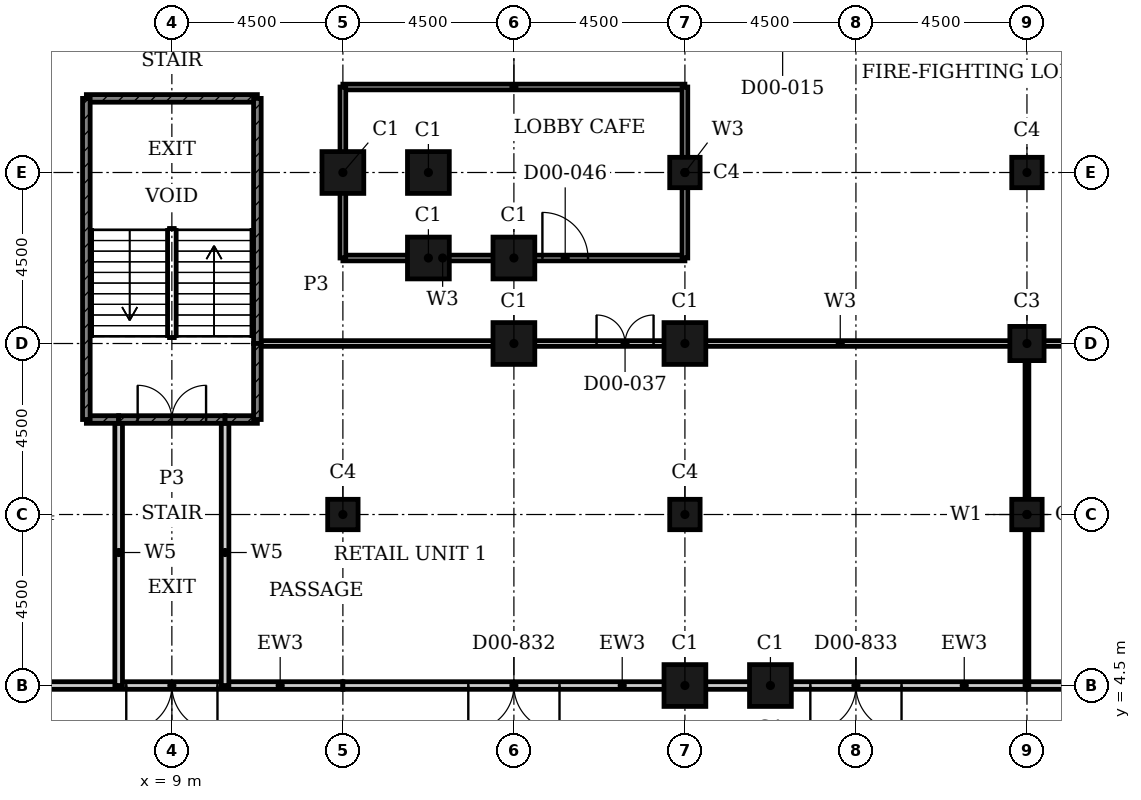
"""IFC4 building model, lengths in metres.
Left out: names, types, materials, properties, quantities, classifications, styles, units other than length and angle.
Written with IfcOpenShell. Run it as: python <this file> out.ifc"""

import sys

from ifc_helpers import new_model, si_unit, direction, frame, frame_2d, origin, origin_2d, place, context, subcontext, project, spatial, rectangle, hollow_rectangle, extrude, element, fill, save


model = new_model("IFC4")
c1 = context("Model", 3, precision=1e-05, world=origin(), true_north=direction((0.0, 1.0)))
c2 = subcontext(c1, "Body", "Model", "MODEL_VIEW")
j1 = project(units=[si_unit("LENGTHUNIT", "METRE"), si_unit("PLANEANGLEUNIT", "RADIAN")], contexts=[c1])
p1 = place(None, origin())
s1 = spatial("IfcSite", under=j1, at=p1, CompositionType="ELEMENT")
p2 = place(p1, origin())
s2 = spatial("IfcBuilding", under=s1, at=p2, CompositionType="ELEMENT")
p3 = place(p2, origin())
s3 = spatial("IfcBuildingStorey", under=s2, at=p3, CompositionType="ELEMENT", Elevation=0.0)
for number, where, z_axis, x_axis in (
    (1, (22.5, 4.5, 0.0), (0.0, 0.0, 1.0), (1.0, 0.0, 0.0)),
    (2, (24.75, 4.5, 0.0), (0.0, 0.0, 1.0), (1.0, 0.0, 0.0)),
    (3, (13.5, 18.0, 0.0), (0.0, 0.0, 1.0), (1.0, 0.0, 0.0)),
    (4, (15.75, 18.0, 0.0), (0.0, 0.0, 1.0), (1.0, 0.0, 0.0)),
    (5, (15.75, 15.75, 0.0), (0.0, 0.0, 1.0), (1.0, 0.0, 0.0)),
    (6, (18.0, 15.75, 0.0), (0.0, 0.0, 1.0), (1.0, 0.0, 0.0)),
    (7, (18.0, 13.5, 0.0), (0.0, 0.0, 1.0), (1.0, 0.0, 0.0)),
    (8, (22.5, 13.5, 0.0), (0.0, 0.0, 1.0), (1.0, 0.0, 0.0)),
):
    element("IfcColumn", number, at=place(p3, frame(where, z_axis=z_axis, x_axis=x_axis)), inside=s3, PredefinedType="COLUMN", context=c2, shape_type="SweptSolid", body=[
        extrude(hollow_rectangle(XDim=1.1, YDim=1.1, WallThickness=0.036, at=origin_2d()), origin(), (0.0, 0.0, 1.0), 6.6),
    ])
p4 = place(p3, frame((31.5, 13.5, 0.0), z_axis=(0.0, 0.0, 1.0), x_axis=(1.0, 0.0, 0.0)))
e9 = element("IfcColumn", 9, at=p4, inside=s3, PredefinedType="COLUMN", context=c2, shape_type="SweptSolid", body=[
    extrude(hollow_rectangle(XDim=0.9, YDim=0.9, WallThickness=0.028, at=origin_2d()), origin(), (0.0, 0.0, 1.0), 6.6),
])
for number, where, z_axis, x_axis in (
    (10, (13.5, 9.0, 0.0), (0.0, 0.0, 1.0), (1.0, 0.0, 0.0)),
    (11, (22.5, 9.0, 0.0), (0.0, 0.0, 1.0), (1.0, 0.0, 0.0)),
    (12, (22.5, 18.0, 0.0), (0.0, 0.0, 1.0), (1.0, 0.0, 0.0)),
    (13, (31.5, 9.0, 0.0), (0.0, 0.0, 1.0), (1.0, 0.0, 0.0)),
    (14, (31.5, 18.0, 0.0), (0.0, 0.0, 1.0), (1.0, 0.0, 0.0)),
):
    element("IfcColumn", number, at=place(p3, frame(where, z_axis=z_axis, x_axis=x_axis)), inside=s3, PredefinedType="COLUMN", context=c2, shape_type="SweptSolid", body=[
        extrude(hollow_rectangle(XDim=0.8, YDim=0.8, WallThickness=0.025, at=origin_2d()), origin(), (0.0, 0.0, 1.0), 6.6),
    ])
p5 = place(p3, frame((13.5, 4.5, 0.0), z_axis=(0.0, 0.0, 1.0), x_axis=(-1.0, 0.0, 0.0)))
e15 = element("IfcWall", 15, at=p5, inside=s3, PredefinedType="SOLIDWALL", context=c2, shape_type="SweptSolid", body=[
    extrude(rectangle(XDim=9.0, YDim=0.2, at=frame_2d((4.5, 0.0))), origin(), (0.0, 0.0, 1.0), 6.25),
])
p6 = place(p5, frame((3.3, 0.0, 0.0)))
e16 = element("IfcOpeningElement", 16, at=p6, cuts=e15, PredefinedType="OPENING", context=c2, shape_type="SweptSolid", body=[
    extrude(rectangle(XDim=2.4, YDim=2.4, at=frame_2d((1.2, 1.2))), frame((0.0, 0.11, 0.0), z_axis=(0.0, -1.0, 0.0), x_axis=(1.0, 0.0, 0.0)), (0.0, 0.0, 1.0), 0.22),
])
p7 = place(p3, frame((22.5, 4.5, 0.0), z_axis=(0.0, 0.0, 1.0), x_axis=(-1.0, 0.0, 0.0)))
e17 = element("IfcWall", 17, at=p7, inside=s3, PredefinedType="SOLIDWALL", context=c2, shape_type="SweptSolid", body=[
    extrude(rectangle(XDim=9.0, YDim=0.2, at=frame_2d((4.5, 0.0))), origin(), (0.0, 0.0, 1.0), 6.25),
])
p8 = place(p7, frame((3.3, 0.0, 0.0)))
e18 = element("IfcOpeningElement", 18, at=p8, cuts=e17, PredefinedType="OPENING", context=c2, shape_type="SweptSolid", body=[
    extrude(rectangle(XDim=2.4, YDim=2.4, at=frame_2d((1.2, 1.2))), frame((0.0, 0.11, 0.0), z_axis=(0.0, -1.0, 0.0), x_axis=(1.0, 0.0, 0.0)), (0.0, 0.0, 1.0), 0.22),
])
p9 = place(p3, frame((31.5, 4.5, 0.0), z_axis=(0.0, 0.0, 1.0), x_axis=(-1.0, 0.0, 0.0)))
e19 = element("IfcWall", 19, at=p9, inside=s3, PredefinedType="SOLIDWALL", context=c2, shape_type="SweptSolid", body=[
    extrude(rectangle(XDim=9.0, YDim=0.2, at=frame_2d((4.5, 0.0))), origin(), (0.0, 0.0, 1.0), 6.25),
])
p10 = place(p9, frame((3.3, 0.0, 0.0)))
e20 = element("IfcOpeningElement", 20, at=p10, cuts=e19, PredefinedType="OPENING", context=c2, shape_type="SweptSolid", body=[
    extrude(rectangle(XDim=2.4, YDim=2.4, at=frame_2d((1.2, 1.2))), frame((0.0, 0.11, 0.0), z_axis=(0.0, -1.0, 0.0), x_axis=(1.0, 0.0, 0.0)), (0.0, 0.0, 1.0), 0.22),
])
p11 = place(p3, frame((40.5, 4.5, 0.0), z_axis=(0.0, 0.0, 1.0), x_axis=(-1.0, 0.0, 0.0)))
e21 = element("IfcWall", 21, at=p11, inside=s3, PredefinedType="SOLIDWALL", context=c2, shape_type="SweptSolid", body=[
    extrude(rectangle(XDim=9.0, YDim=0.2, at=frame_2d((4.5, 0.0))), origin(), (0.0, 0.0, 1.0), 6.25),
])
p12 = place(p11, frame((3.3, 0.0, 0.0)))
e22 = element("IfcOpeningElement", 22, at=p12, cuts=e21, PredefinedType="OPENING", context=c2, shape_type="SweptSolid", body=[
    extrude(rectangle(XDim=2.4, YDim=2.4, at=frame_2d((1.2, 1.2))), frame((0.0, 0.11, 0.0), z_axis=(0.0, -1.0, 0.0), x_axis=(1.0, 0.0, 0.0)), (0.0, 0.0, 1.0), 0.22),
])
p13 = place(p3, frame((11.25, 13.5, 0.0), z_axis=(0.0, 0.0, 1.0), x_axis=(1.0, 0.0, 0.0)))
e23 = element("IfcWall", 23, at=p13, inside=s3, PredefinedType="PARTITIONING", context=c2, shape_type="SweptSolid", body=[
    extrude(rectangle(XDim=20.25, YDim=0.15, at=frame_2d((10.125, 0.0))), origin(), (0.0, 0.0, 1.0), 6.25),
])
p14 = place(p13, frame((8.925, 0.0, 0.0)))
e24 = element("IfcOpeningElement", 24, at=p14, cuts=e23, PredefinedType="OPENING", context=c2, shape_type="SweptSolid", body=[
    extrude(rectangle(XDim=1.5, YDim=2.4, at=frame_2d((0.75, 1.2))), frame((0.0, 0.085, 0.0), z_axis=(0.0, -1.0, 0.0), x_axis=(1.0, 0.0, 0.0)), (0.0, 0.0, 1.0), 0.17),
])
p15 = place(p3, frame((31.5, 13.5, 0.0), z_axis=(0.0, 0.0, 1.0), x_axis=(1.0, 0.0, 0.0)))
e25 = element("IfcWall", 25, at=p15, inside=s3, PredefinedType="PARTITIONING", context=c2, shape_type="SweptSolid", body=[
    extrude(rectangle(XDim=9.0, YDim=0.15, at=frame_2d((4.5, 0.0))), origin(), (0.0, 0.0, 1.0), 6.25),
])
p16 = place(p15, frame((3.75, 0.0, 0.0)))
e26 = element("IfcOpeningElement", 26, at=p16, cuts=e25, PredefinedType="OPENING", context=c2, shape_type="SweptSolid", body=[
    extrude(rectangle(XDim=1.5, YDim=2.4, at=frame_2d((0.75, 1.2))), frame((0.0, 0.085, 0.0), z_axis=(0.0, -1.0, 0.0), x_axis=(1.0, 0.0, 0.0)), (0.0, 0.0, 1.0), 0.17),
])
p17 = place(p3, frame((13.5, 15.75, 0.0), z_axis=(0.0, 0.0, 1.0), x_axis=(1.0, 0.0, 0.0)))
e27 = element("IfcWall", 27, at=p17, inside=s3, PredefinedType="PARTITIONING", context=c2, shape_type="SweptSolid", body=[
    extrude(rectangle(XDim=9.0, YDim=0.15, at=frame_2d((4.5, 0.0))), origin(), (0.0, 0.0, 1.0), 6.25),
])
p18 = place(p17, frame((5.25, 0.0, 0.0)))
e28 = element("IfcOpeningElement", 28, at=p18, cuts=e27, PredefinedType="OPENING", context=c2, shape_type="SweptSolid", body=[
    extrude(rectangle(XDim=1.2, YDim=2.4, at=frame_2d((0.6, 1.2))), frame((0.0, 0.085, 0.0), z_axis=(0.0, -1.0, 0.0), x_axis=(1.0, 0.0, 0.0)), (0.0, 0.0, 1.0), 0.17),
])
p19 = place(p3, frame((13.5, 20.25, 0.0), z_axis=(0.0, 0.0, 1.0), x_axis=(1.0, 0.0, 0.0)))
e29 = element("IfcWall", 29, at=p19, inside=s3, PredefinedType="PARTITIONING", context=c2, shape_type="SweptSolid", body=[
    extrude(rectangle(XDim=9.0, YDim=0.15, at=frame_2d((4.5, 0.0))), origin(), (0.0, 0.0, 1.0), 6.25),
])
for number, where, z_axis, x_axis in (
    (30, (13.5, 15.75, 0.0), (0.0, 0.0, 1.0), (0.0, 1.0, 0.0)),
    (31, (22.5, 15.75, 0.0), (0.0, 0.0, 1.0), (0.0, 1.0, 0.0)),
):
    element("IfcWall", number, at=place(p3, frame(where, z_axis=z_axis, x_axis=x_axis)), inside=s3, PredefinedType="PARTITIONING", context=c2, shape_type="SweptSolid", body=[
        extrude(rectangle(XDim=4.5, YDim=0.15, at=frame_2d((2.25, 0.0))), origin(), (0.0, 0.0, 1.0), 6.25),
    ])
p20 = place(p3, frame((31.5, 4.5, 0.0), z_axis=(0.0, 0.0, 1.0), x_axis=(0.0, 1.0, 0.0)))
e32 = element("IfcWall", 32, at=p20, inside=s3, PredefinedType="PARTITIONING", context=c2, shape_type="SweptSolid", body=[
    extrude(rectangle(XDim=9.0, YDim=0.1, at=frame_2d((4.5, 0.0))), origin(), (0.0, 0.0, 1.0), 6.25),
])
for number, where, z_axis, x_axis in (
    (33, (10.4, 4.5, 0.0), (0.0, 0.0, 1.0), (0.0, 1.0, 0.0)),
    (34, (7.6, 4.5, 0.0), (0.0, 0.0, 1.0), (0.0, 1.0, 0.0)),
):
    element("IfcWall", number, at=place(p3, frame(where, z_axis=z_axis, x_axis=x_axis)), inside=s3, PredefinedType="PARTITIONING", context=c2, shape_type="SweptSolid", body=[
        extrude(rectangle(XDim=7.0, YDim=0.2, at=frame_2d((3.5, 0.0))), origin(), (0.0, 0.0, 1.0), 6.25),
    ])
p21 = place(p3, frame((6.75, 11.5, 0.0), z_axis=(0.0, 0.0, 1.0), x_axis=(1.0, 0.0, 0.0)))
e35 = element("IfcWall", 35, at=p21, inside=s3, PredefinedType="SHEAR", context=c2, shape_type="SweptSolid", body=[
    extrude(rectangle(XDim=0.85, YDim=0.2, at=frame_2d((0.425, 0.0))), origin(), (0.0, 0.0, 1.0), 6.25),
])
p22 = place(p3, frame((7.6, 11.5, 0.0), z_axis=(0.0, 0.0, 1.0), x_axis=(1.0, 0.0, 0.0)))
e36 = element("IfcWall", 36, at=p22, inside=s3, PredefinedType="SHEAR", context=c2, shape_type="SweptSolid", body=[
    extrude(rectangle(XDim=2.8, YDim=0.2, at=frame_2d((1.4, 0.0))), origin(), (0.0, 0.0, 1.0), 6.25),
])
p23 = place(p22, frame((0.5, 0.0, 0.0)))
e37 = element("IfcOpeningElement", 37, at=p23, cuts=e36, PredefinedType="OPENING", context=c2, shape_type="SweptSolid", body=[
    extrude(rectangle(XDim=1.8, YDim=2.1, at=frame_2d((0.9, 1.05))), frame((0.0, 0.11, 0.0), z_axis=(0.0, -1.0, 0.0), x_axis=(1.0, 0.0, 0.0)), (0.0, 0.0, 1.0), 0.22),
])
p24 = place(p3, frame((10.4, 11.5, 0.0), z_axis=(0.0, 0.0, 1.0), x_axis=(1.0, 0.0, 0.0)))
e38 = element("IfcWall", 38, at=p24, inside=s3, PredefinedType="SHEAR", context=c2, shape_type="SweptSolid", body=[
    extrude(rectangle(XDim=0.85, YDim=0.2, at=frame_2d((0.425, 0.0))), origin(), (0.0, 0.0, 1.0), 6.25),
])
p25 = place(p3, frame((6.75, 19.95, 0.0), z_axis=(0.0, 0.0, 1.0), x_axis=(1.0, 0.0, 0.0)))
e39 = element("IfcWall", 39, at=p25, inside=s3, PredefinedType="SHEAR", context=c2, shape_type="SweptSolid", body=[
    extrude(rectangle(XDim=4.5, YDim=0.2, at=frame_2d((2.25, 0.0))), origin(), (0.0, 0.0, 1.0), 6.25),
])
p26 = place(p3, frame((11.25, 13.5, 0.0), z_axis=(0.0, 0.0, 1.0), x_axis=(0.0, 1.0, 0.0)))
e40 = element("IfcWall", 40, at=p26, inside=s3, PredefinedType="SHEAR", context=c2, shape_type="SweptSolid", body=[
    extrude(rectangle(XDim=6.45, YDim=0.2, at=frame_2d((3.225, 0.0))), origin(), (0.0, 0.0, 1.0), 6.25),
])
p27 = place(p3, frame((11.25, 11.5, 0.0), z_axis=(0.0, 0.0, 1.0), x_axis=(0.0, 1.0, 0.0)))
e41 = element("IfcWall", 41, at=p27, inside=s3, PredefinedType="SHEAR", context=c2, shape_type="SweptSolid", body=[
    extrude(rectangle(XDim=2.0, YDim=0.2, at=frame_2d((1.0, 0.0))), origin(), (0.0, 0.0, 1.0), 6.25),
])
p28 = place(p3, frame((6.75, 11.5, 0.0), z_axis=(0.0, 0.0, 1.0), x_axis=(0.0, 1.0, 0.0)))
e42 = element("IfcWall", 42, at=p28, inside=s3, PredefinedType="SHEAR", context=c2, shape_type="SweptSolid", body=[
    extrude(rectangle(XDim=8.45, YDim=0.2, at=frame_2d((4.225, 0.0))), origin(), (0.0, 0.0, 1.0), 6.25),
])
p29 = place(p6, origin())
e43 = element("IfcDoor", 43, at=p29, inside=s3, OperationType="DOUBLE_DOOR_SINGLE_SWING", PredefinedType="DOOR", context=c2, shape_type="SweptSolid", body=[
    extrude(rectangle(XDim=2.4, YDim=2.4, at=frame_2d((1.2, 1.2))), frame((0.0, 0.025, 0.0), z_axis=(0.0, -1.0, 0.0), x_axis=(1.0, 0.0, 0.0)), (0.0, 0.0, 1.0), 0.05),
])
fill(e16, e43)
p30 = place(p8, origin())
e44 = element("IfcDoor", 44, at=p30, inside=s3, OperationType="DOUBLE_DOOR_SINGLE_SWING", PredefinedType="DOOR", context=c2, shape_type="SweptSolid", body=[
    extrude(rectangle(XDim=2.4, YDim=2.4, at=frame_2d((1.2, 1.2))), frame((0.0, 0.025, 0.0), z_axis=(0.0, -1.0, 0.0), x_axis=(1.0, 0.0, 0.0)), (0.0, 0.0, 1.0), 0.05),
])
fill(e18, e44)
p31 = place(p10, origin())
e45 = element("IfcDoor", 45, at=p31, inside=s3, OperationType="DOUBLE_DOOR_SINGLE_SWING", PredefinedType="DOOR", context=c2, shape_type="SweptSolid", body=[
    extrude(rectangle(XDim=2.4, YDim=2.4, at=frame_2d((1.2, 1.2))), frame((0.0, 0.025, 0.0), z_axis=(0.0, -1.0, 0.0), x_axis=(1.0, 0.0, 0.0)), (0.0, 0.0, 1.0), 0.05),
])
fill(e20, e45)
p32 = place(p23, origin())
e46 = element("IfcDoor", 46, at=p32, inside=s3, OperationType="DOUBLE_DOOR_SINGLE_SWING", PredefinedType="DOOR", context=c2, shape_type="SweptSolid", body=[
    extrude(rectangle(XDim=1.8, YDim=2.1, at=frame_2d((0.9, 1.05))), frame((0.0, 0.025, 0.0), z_axis=(0.0, -1.0, 0.0), x_axis=(1.0, 0.0, 0.0)), (0.0, 0.0, 1.0), 0.05),
])
fill(e37, e46)
p33 = place(p14, origin())
e47 = element("IfcDoor", 47, at=p33, inside=s3, OperationType="DOUBLE_DOOR_SINGLE_SWING", PredefinedType="DOOR", context=c2, shape_type="SweptSolid", body=[
    extrude(rectangle(XDim=1.5, YDim=2.4, at=frame_2d((0.75, 1.2))), frame((0.0, 0.025, 0.0), z_axis=(0.0, -1.0, 0.0), x_axis=(1.0, 0.0, 0.0)), (0.0, 0.0, 1.0), 0.05),
])
fill(e24, e47)
p34 = place(p18, origin())
e48 = element("IfcDoor", 48, at=p34, inside=s3, OperationType="SINGLE_SWING_RIGHT", PredefinedType="DOOR", context=c2, shape_type="SweptSolid", body=[
    extrude(rectangle(XDim=1.2, YDim=2.4, at=frame_2d((0.6, 1.2))), frame((0.0, 0.025, 0.0), z_axis=(0.0, -1.0, 0.0), x_axis=(1.0, 0.0, 0.0)), (0.0, 0.0, 1.0), 0.05),
])
fill(e28, e48)
save(model, sys.argv[1])
